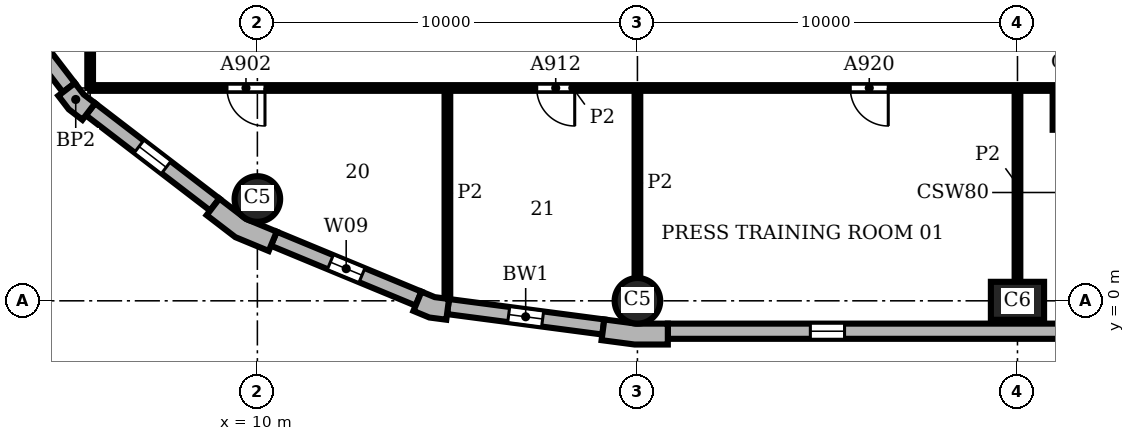
"""IFC4 building model, lengths in metres.
Left out: names, types, materials, properties, quantities, classifications, styles, units other than length and angle.
Written with IfcOpenShell. Run it as: python <this file> out.ifc"""

import sys

from ifc_helpers import new_model, si_unit, direction, frame, frame_2d, origin, origin_2d, place, context, subcontext, project, spatial, polyline, rectangle, circle, outline, extrude, element, fill, save


model = new_model("IFC4")
c1 = context("Model", 3, precision=1e-05, world=origin(), true_north=direction((0.0, 1.0)))
c2 = subcontext(c1, "Body", "Model", "MODEL_VIEW")
j1 = project(units=[si_unit("LENGTHUNIT", "METRE"), si_unit("PLANEANGLEUNIT", "RADIAN")], contexts=[c1])
p1 = place(None, origin())
s1 = spatial("IfcSite", under=j1, at=p1, CompositionType="ELEMENT")
p2 = place(p1, origin())
s2 = spatial("IfcBuilding", under=s1, at=p2, CompositionType="ELEMENT")
p3 = place(p2, frame((0.0, 0.0, 105.6)))
s3 = spatial("IfcBuildingStorey", under=s2, at=p3, CompositionType="ELEMENT", Elevation=105.6)
p4 = place(p3, frame((20.0, 0.0, 0.0), z_axis=(0.0, 0.0, 1.0), x_axis=(1.0, 0.0, 0.0)))
e1 = element("IfcColumn", 1, at=p4, inside=s3, PredefinedType="COLUMN", context=c2, shape_type="SweptSolid", body=[
    extrude(circle(Radius=0.6, at=origin_2d()), origin(), (0.0, 0.0, 1.0), 3.9),
])
p5 = place(p3, frame((30.0, 0.0, 0.0), z_axis=(0.0, 0.0, 1.0), x_axis=(1.0, 0.0, 0.0)))
e2 = element("IfcColumn", 2, at=p5, inside=s3, PredefinedType="COLUMN", context=c2, shape_type="SweptSolid", body=[
    extrude(rectangle(XDim=1.4, YDim=1.0, at=origin_2d()), origin(), (0.0, 0.0, 1.0), 3.9),
])
p6 = place(p3, frame((10.0, 2.679, 0.0), z_axis=(0.0, 0.0, 1.0), x_axis=(1.0, 0.0, 0.0)))
e3 = element("IfcColumn", 3, at=p6, inside=s3, PredefinedType="COLUMN", context=c2, shape_type="SweptSolid", body=[
    extrude(circle(Radius=0.6, at=origin_2d()), origin(), (0.0, 0.0, 1.0), 3.9),
])
p7 = place(p3, origin())
e4 = element("IfcWall", 4, at=p7, inside=s3, PredefinedType="SOLIDWALL", context=c2, shape_type="SweptSolid", body=[
    extrude(outline(polyline([(19.076, -0.887), (19.057, -1.036), (19.925, -1.15), (20.8, -1.15), (20.8, -1.0), (20.8, -0.6), (19.961, -0.6), (19.128, -0.49), (19.076, -0.887)])), origin(), (0.0, 0.0, 1.0), 3.9),
])
e5 = element("IfcWall", 5, at=p7, inside=s3, PredefinedType="SOLIDWALL", context=c2, shape_type="SweptSolid", body=[
    extrude(outline(polyline([(4.882, 5.487), (4.763, 5.396), (5.038, 5.038), (5.396, 4.763), (5.487, 4.882), (5.731, 5.199), (5.43, 5.43), (5.199, 5.731), (4.882, 5.487)])), origin(), (0.0, 0.0, 1.0), 3.9),
])
e6 = element("IfcWall", 6, at=p7, inside=s3, PredefinedType="SOLIDWALL", context=c2, shape_type="SweptSolid", body=[
    extrude(outline(polyline([(8.757, 2.373), (8.665, 2.254), (9.42, 1.675), (10.299, 1.311), (10.356, 1.449), (10.51, 1.819), (9.698, 2.155), (9.0, 2.69), (8.757, 2.373)])), origin(), (0.0, 0.0, 1.0), 3.9),
])
e7 = element("IfcWall", 7, at=p7, inside=s3, PredefinedType="SOLIDWALL", context=c2, shape_type="SweptSolid", body=[
    extrude(outline(polyline([(14.164, -0.128), (14.106, -0.266), (14.523, -0.439), (14.971, -0.498), (14.99, -0.349), (15.043, 0.047), (14.667, 0.097), (14.317, 0.242), (14.164, -0.128)])), origin(), (0.0, 0.0, 1.0), 3.9),
])
p8 = place(p3, frame((20.8, -0.8, 0.0), z_axis=(0.0, 0.0, 1.0), x_axis=(1.0, 0.0, 0.0)))
e8 = element("IfcWall", 8, at=p8, inside=s3, PredefinedType="SOLIDWALL", context=c2, shape_type="SweptSolid", body=[
    extrude(rectangle(XDim=48.4, YDim=0.4, at=frame_2d((24.2, 0.0))), origin(), (0.0, 0.0, 1.0), 3.9),
])
p9 = place(p8, frame((3.75, 0.0, 0.9)))
e9 = element("IfcOpeningElement", 9, at=p9, cuts=e8, PredefinedType="OPENING", context=c2, shape_type="SweptSolid", body=[
    extrude(rectangle(XDim=0.9, YDim=2.35, at=frame_2d((0.45, 1.175))), frame((0.0, 0.21, 0.0), z_axis=(0.0, -1.0, 0.0), x_axis=(1.0, 0.0, 0.0)), (0.0, 0.0, 1.0), 0.42),
])
p10 = place(p8, frame((13.75, 0.0, 0.9)))
e10 = element("IfcOpeningElement", 10, at=p10, cuts=e8, PredefinedType="OPENING", context=c2, shape_type="SweptSolid", body=[
    extrude(rectangle(XDim=0.9, YDim=2.35, at=frame_2d((0.45, 1.175))), frame((0.0, 0.21, 0.0), z_axis=(0.0, -1.0, 0.0), x_axis=(1.0, 0.0, 0.0)), (0.0, 0.0, 1.0), 0.42),
])
p11 = place(p8, frame((23.75, 0.0, 0.9)))
e11 = element("IfcOpeningElement", 11, at=p11, cuts=e8, PredefinedType="OPENING", context=c2, shape_type="SweptSolid", body=[
    extrude(rectangle(XDim=0.9, YDim=2.35, at=frame_2d((0.45, 1.175))), frame((0.0, 0.21, 0.0), z_axis=(0.0, -1.0, 0.0), x_axis=(1.0, 0.0, 0.0)), (0.0, 0.0, 1.0), 0.42),
])
p12 = place(p8, frame((33.75, 0.0, 0.9)))
e12 = element("IfcOpeningElement", 12, at=p12, cuts=e8, PredefinedType="OPENING", context=c2, shape_type="SweptSolid", body=[
    extrude(rectangle(XDim=0.9, YDim=2.35, at=frame_2d((0.45, 1.175))), frame((0.0, 0.21, 0.0), z_axis=(0.0, -1.0, 0.0), x_axis=(1.0, 0.0, 0.0)), (0.0, 0.0, 1.0), 0.42),
])
p13 = place(p8, frame((43.75, 0.0, 0.9)))
e13 = element("IfcOpeningElement", 13, at=p13, cuts=e8, PredefinedType="OPENING", context=c2, shape_type="SweptSolid", body=[
    extrude(rectangle(XDim=0.9, YDim=2.35, at=frame_2d((0.45, 1.175))), frame((0.0, 0.21, 0.0), z_axis=(0.0, -1.0, 0.0), x_axis=(1.0, 0.0, 0.0)), (0.0, 0.0, 1.0), 0.42),
])
p14 = place(p3, frame((2.532, 8.878, 0.0), z_axis=(0.0, 0.0, 1.0), x_axis=(0.608759824817, -0.793354571229, 0.0)))
e14 = element("IfcWall", 14, at=p14, inside=s3, PredefinedType="SOLIDWALL", context=c2, shape_type="SweptSolid", body=[
    extrude(rectangle(XDim=4.121, YDim=0.4, at=frame_2d((2.061, 0.0))), origin(), (0.0, 0.0, 1.0), 3.9),
])
p15 = place(p14, frame((1.611, 0.0, 0.9)))
e15 = element("IfcOpeningElement", 15, at=p15, cuts=e14, PredefinedType="OPENING", context=c2, shape_type="SweptSolid", body=[
    extrude(rectangle(XDim=0.9, YDim=2.35, at=frame_2d((0.45, 1.175))), frame((0.0, 0.21, 0.0), z_axis=(0.0, -1.0, 0.0), x_axis=(1.0, 0.0, 0.0)), (0.0, 0.0, 1.0), 0.42),
])
p16 = place(p3, frame((5.609, 5.041, 0.0), z_axis=(0.0, 0.0, 1.0), x_axis=(0.793354571229, -0.608759824817, 0.0)))
e16 = element("IfcWall", 16, at=p16, inside=s3, PredefinedType="SOLIDWALL", context=c2, shape_type="SweptSolid", body=[
    extrude(rectangle(XDim=4.121, YDim=0.4, at=frame_2d((2.061, 0.0))), origin(), (0.0, 0.0, 1.0), 3.9),
])
p17 = place(p16, frame((1.611, 0.0, 0.9)))
e17 = element("IfcOpeningElement", 17, at=p17, cuts=e16, PredefinedType="OPENING", context=c2, shape_type="SweptSolid", body=[
    extrude(rectangle(XDim=0.9, YDim=2.35, at=frame_2d((0.45, 1.175))), frame((0.0, 0.21, 0.0), z_axis=(0.0, -1.0, 0.0), x_axis=(1.0, 0.0, 0.0)), (0.0, 0.0, 1.0), 0.42),
])
p18 = place(p3, frame((10.433, 1.634, 0.0), z_axis=(0.0, 0.0, 1.0), x_axis=(0.923863744394, -0.382721546029, 0.0)))
e18 = element("IfcWall", 18, at=p18, inside=s3, PredefinedType="SOLIDWALL", context=c2, shape_type="SweptSolid", body=[
    extrude(rectangle(XDim=4.121, YDim=0.4, at=frame_2d((2.061, 0.0))), origin(), (0.0, 0.0, 1.0), 3.9),
])
p19 = place(p18, frame((1.611, 0.0, 0.9)))
e19 = element("IfcOpeningElement", 19, at=p19, cuts=e18, PredefinedType="OPENING", context=c2, shape_type="SweptSolid", body=[
    extrude(rectangle(XDim=0.9, YDim=2.35, at=frame_2d((0.45, 1.175))), frame((0.0, 0.21, 0.0), z_axis=(0.0, -1.0, 0.0), x_axis=(1.0, 0.0, 0.0)), (0.0, 0.0, 1.0), 0.42),
])
p20 = place(p3, frame((15.017, -0.151, 0.0), z_axis=(0.0, 0.0, 1.0), x_axis=(0.991446429508, -0.130514280502, 0.0)))
e20 = element("IfcWall", 20, at=p20, inside=s3, PredefinedType="SOLIDWALL", context=c2, shape_type="SweptSolid", body=[
    extrude(rectangle(XDim=4.121, YDim=0.4, at=frame_2d((2.061, 0.0))), origin(), (0.0, 0.0, 1.0), 3.9),
])
p21 = place(p20, frame((1.611, 0.0, 0.9)))
e21 = element("IfcOpeningElement", 21, at=p21, cuts=e20, PredefinedType="OPENING", context=c2, shape_type="SweptSolid", body=[
    extrude(rectangle(XDim=0.9, YDim=2.35, at=frame_2d((0.45, 1.175))), frame((0.0, 0.21, 0.0), z_axis=(0.0, -1.0, 0.0), x_axis=(1.0, 0.0, 0.0)), (0.0, 0.0, 1.0), 0.42),
])
p22 = place(p3, frame((5.6, 5.6, 0.0), z_axis=(0.0, 0.0, 1.0), x_axis=(0.0, 1.0, 0.0)))
e22 = element("IfcWall", 22, at=p22, inside=s3, PredefinedType="PARTITIONING", context=c2, shape_type="SweptSolid", body=[
    extrude(rectangle(XDim=54.4, YDim=0.15, at=frame_2d((27.2, 0.0))), origin(), (0.0, 0.0, 1.0), 3.58),
])
p23 = place(p22, frame((35.8, 0.0, 0.0)))
e23 = element("IfcOpeningElement", 23, at=p23, cuts=e22, PredefinedType="OPENING", context=c2, shape_type="SweptSolid", body=[
    extrude(rectangle(XDim=1.8, YDim=2.1, at=frame_2d((0.9, 1.05))), frame((0.0, 0.085, 0.0), z_axis=(0.0, -1.0, 0.0), x_axis=(1.0, 0.0, 0.0)), (0.0, 0.0, 1.0), 0.17),
])
p24 = place(p3, frame((15.0, 0.063, 0.0), z_axis=(0.0, 0.0, 1.0), x_axis=(0.0, 1.0, 0.0)))
e24 = element("IfcWall", 24, at=p24, inside=s3, PredefinedType="PARTITIONING", context=c2, shape_type="SweptSolid", body=[
    extrude(rectangle(XDim=5.537, YDim=0.15, at=frame_2d((2.769, 0.0))), origin(), (0.0, 0.0, 1.0), 3.58),
])
p25 = place(p3, frame((20.0, 0.6, 0.0), z_axis=(0.0, 0.0, 1.0), x_axis=(0.0, 1.0, 0.0)))
e25 = element("IfcWall", 25, at=p25, inside=s3, PredefinedType="PARTITIONING", context=c2, shape_type="SweptSolid", body=[
    extrude(rectangle(XDim=5.0, YDim=0.15, at=frame_2d((2.5, 0.0))), origin(), (0.0, 0.0, 1.0), 3.58),
])
p26 = place(p3, frame((30.0, 0.5, 0.0), z_axis=(0.0, 0.0, 1.0), x_axis=(0.0, 1.0, 0.0)))
e26 = element("IfcWall", 26, at=p26, inside=s3, PredefinedType="PARTITIONING", context=c2, shape_type="SweptSolid", body=[
    extrude(rectangle(XDim=5.1, YDim=0.15, at=frame_2d((2.55, 0.0))), origin(), (0.0, 0.0, 1.0), 3.58),
])
p27 = place(p3, frame((31.0, 4.5, 0.0), z_axis=(0.0, 0.0, 1.0), x_axis=(0.0, 1.0, 0.0)))
e27 = element("IfcWall", 27, at=p27, inside=s3, PredefinedType="PARTITIONING", context=c2, shape_type="SweptSolid", body=[
    extrude(rectangle(XDim=1.1, YDim=0.15, at=frame_2d((0.55, 0.0))), origin(), (0.0, 0.0, 1.0), 3.58),
])
p28 = place(p3, frame((5.6, 5.6, 0.0), z_axis=(0.0, 0.0, 1.0), x_axis=(1.0, 0.0, 0.0)))
e28 = element("IfcWall", 28, at=p28, inside=s3, PredefinedType="PARTITIONING", context=c2, shape_type="SweptSolid", body=[
    extrude(rectangle(XDim=25.4, YDim=0.15, at=frame_2d((12.7, 0.0))), origin(), (0.0, 0.0, 1.0), 3.58),
])
p29 = place(p28, frame((3.6, 0.0, 0.0)))
e29 = element("IfcOpeningElement", 29, at=p29, cuts=e28, PredefinedType="OPENING", context=c2, shape_type="SweptSolid", body=[
    extrude(rectangle(XDim=1.0, YDim=2.1, at=frame_2d((0.5, 1.05))), frame((0.0, 0.085, 0.0), z_axis=(0.0, -1.0, 0.0), x_axis=(1.0, 0.0, 0.0)), (0.0, 0.0, 1.0), 0.17),
])
p30 = place(p28, frame((11.75, 0.0, 0.0)))
e30 = element("IfcOpeningElement", 30, at=p30, cuts=e28, PredefinedType="OPENING", context=c2, shape_type="SweptSolid", body=[
    extrude(rectangle(XDim=1.0, YDim=2.1, at=frame_2d((0.5, 1.05))), frame((0.0, 0.085, 0.0), z_axis=(0.0, -1.0, 0.0), x_axis=(1.0, 0.0, 0.0)), (0.0, 0.0, 1.0), 0.17),
])
p31 = place(p28, frame((20.0, 0.0, 0.0)))
e31 = element("IfcOpeningElement", 31, at=p31, cuts=e28, PredefinedType="OPENING", context=c2, shape_type="SweptSolid", body=[
    extrude(rectangle(XDim=1.0, YDim=2.1, at=frame_2d((0.5, 1.05))), frame((0.0, 0.085, 0.0), z_axis=(0.0, -1.0, 0.0), x_axis=(1.0, 0.0, 0.0)), (0.0, 0.0, 1.0), 0.17),
])
p32 = place(p9, origin())
e32 = element("IfcWindow", 32, at=p32, inside=s3, PartitioningType="SINGLE_PANEL", PredefinedType="WINDOW", context=c2, shape_type="SweptSolid", body=[
    extrude(rectangle(XDim=0.9, YDim=2.35, at=frame_2d((0.45, 1.175))), frame((0.0, 0.16, 0.0), z_axis=(0.0, -1.0, 0.0), x_axis=(1.0, 0.0, 0.0)), (0.0, 0.0, 1.0), 0.06),
])
fill(e9, e32)
p33 = place(p17, origin())
e33 = element("IfcWindow", 33, at=p33, inside=s3, PartitioningType="SINGLE_PANEL", PredefinedType="WINDOW", context=c2, shape_type="SweptSolid", body=[
    extrude(rectangle(XDim=0.9, YDim=2.35, at=frame_2d((0.45, 1.175))), frame((0.0, 0.16, 0.0), z_axis=(0.0, -1.0, 0.0), x_axis=(1.0, 0.0, 0.0)), (0.0, 0.0, 1.0), 0.06),
])
fill(e17, e33)
p34 = place(p19, origin())
e34 = element("IfcWindow", 34, at=p34, inside=s3, PartitioningType="SINGLE_PANEL", PredefinedType="WINDOW", context=c2, shape_type="SweptSolid", body=[
    extrude(rectangle(XDim=0.9, YDim=2.35, at=frame_2d((0.45, 1.175))), frame((0.0, 0.16, 0.0), z_axis=(0.0, -1.0, 0.0), x_axis=(1.0, 0.0, 0.0)), (0.0, 0.0, 1.0), 0.06),
])
fill(e19, e34)
p35 = place(p21, origin())
e35 = element("IfcWindow", 35, at=p35, inside=s3, PartitioningType="SINGLE_PANEL", PredefinedType="WINDOW", context=c2, shape_type="SweptSolid", body=[
    extrude(rectangle(XDim=0.9, YDim=2.35, at=frame_2d((0.45, 1.175))), frame((0.0, 0.16, 0.0), z_axis=(0.0, -1.0, 0.0), x_axis=(1.0, 0.0, 0.0)), (0.0, 0.0, 1.0), 0.06),
])
fill(e21, e35)
p36 = place(p29, frame((1.0, 0.0, 0.0), z_axis=(0.0, 0.0, 1.0), x_axis=(-1.0, 0.0, 0.0)))
e36 = element("IfcDoor", 36, at=p36, inside=s3, OperationType="SINGLE_SWING_LEFT", PredefinedType="DOOR", context=c2, shape_type="SweptSolid", body=[
    extrude(rectangle(XDim=1.0, YDim=2.1, at=frame_2d((0.5, 1.05))), frame((0.0, 0.025, 0.0), z_axis=(0.0, -1.0, 0.0), x_axis=(1.0, 0.0, 0.0)), (0.0, 0.0, 1.0), 0.05),
])
fill(e29, e36)
p37 = place(p30, frame((1.0, 0.0, 0.0), z_axis=(0.0, 0.0, 1.0), x_axis=(-1.0, 0.0, 0.0)))
e37 = element("IfcDoor", 37, at=p37, inside=s3, OperationType="SINGLE_SWING_LEFT", PredefinedType="DOOR", context=c2, shape_type="SweptSolid", body=[
    extrude(rectangle(XDim=1.0, YDim=2.1, at=frame_2d((0.5, 1.05))), frame((0.0, 0.025, 0.0), z_axis=(0.0, -1.0, 0.0), x_axis=(1.0, 0.0, 0.0)), (0.0, 0.0, 1.0), 0.05),
])
fill(e30, e37)
p38 = place(p31, frame((1.0, 0.0, 0.0), z_axis=(0.0, 0.0, 1.0), x_axis=(-1.0, 0.0, 0.0)))
e38 = element("IfcDoor", 38, at=p38, inside=s3, OperationType="SINGLE_SWING_LEFT", PredefinedType="DOOR", context=c2, shape_type="SweptSolid", body=[
    extrude(rectangle(XDim=1.0, YDim=2.1, at=frame_2d((0.5, 1.05))), frame((0.0, 0.025, 0.0), z_axis=(0.0, -1.0, 0.0), x_axis=(1.0, 0.0, 0.0)), (0.0, 0.0, 1.0), 0.05),
])
fill(e31, e38)
save(model, sys.argv[1])
